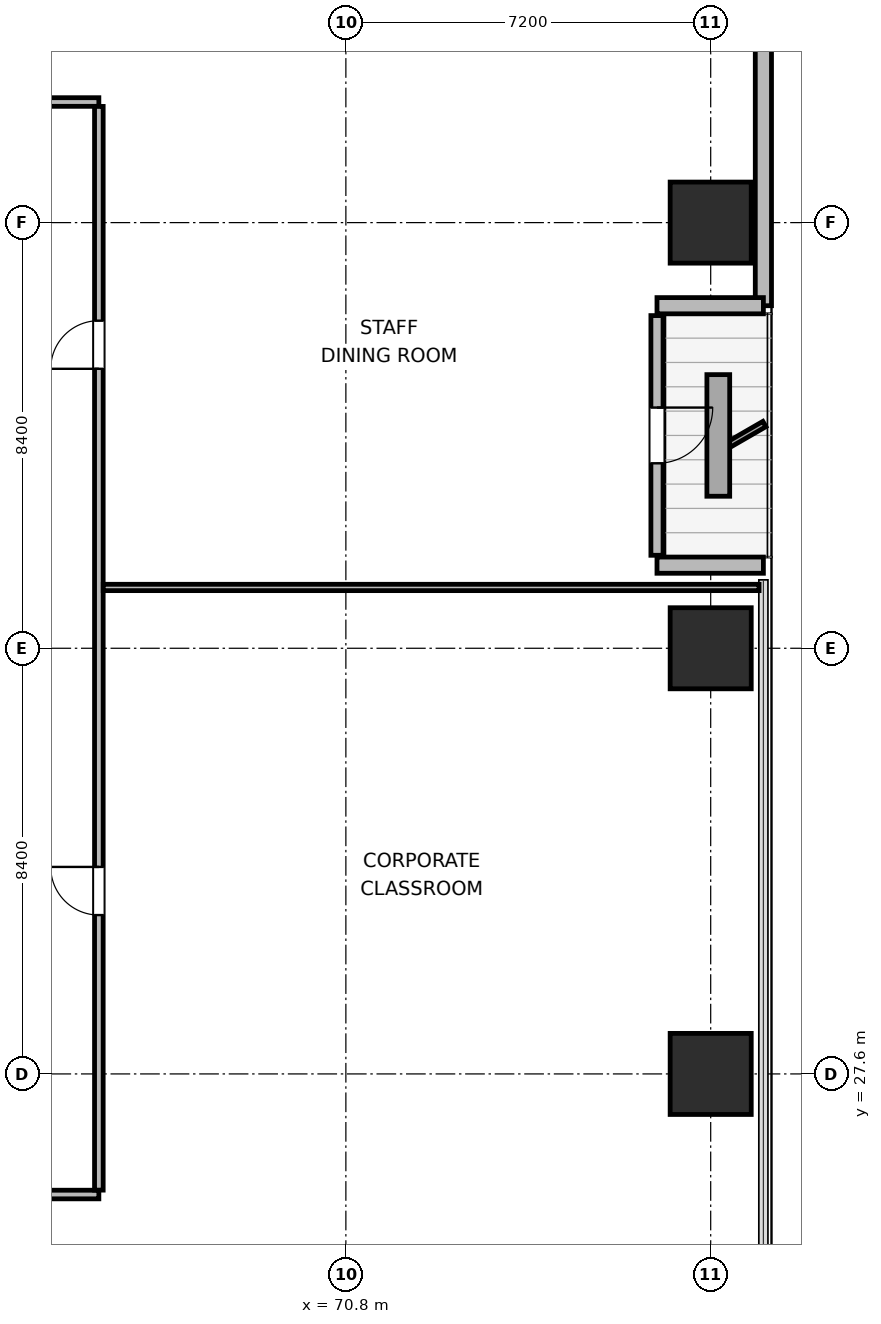
"""IFC4 building model, lengths in metres.
Left out: names, types, materials, properties, quantities, classifications, styles, units other than length and angle.
Written with IfcOpenShell. Run it as: python <this file> out.ifc"""

import sys

from ifc_helpers import new_model, si_unit, direction, frame, frame_2d, origin, origin_2d, place, context, subcontext, project, spatial, rectangle, extrude, element, fill, save


model = new_model("IFC4")
c1 = context("Model", 3, precision=1e-05, world=origin(), true_north=direction((0.0, 1.0)))
c2 = subcontext(c1, "Body", "Model", "MODEL_VIEW")
j1 = project(units=[si_unit("LENGTHUNIT", "METRE"), si_unit("PLANEANGLEUNIT", "RADIAN")], contexts=[c1])
p1 = place(None, origin())
s1 = spatial("IfcSite", under=j1, at=p1, CompositionType="ELEMENT")
p2 = place(p1, origin())
s2 = spatial("IfcBuilding", under=s1, at=p2, CompositionType="ELEMENT")
p3 = place(p2, frame((0.0, 0.0, 41.1)))
s3 = spatial("IfcBuildingStorey", under=s2, at=p3, CompositionType="ELEMENT", Elevation=41.1)
for number, where, z_axis, x_axis in (
    (1, (78.0, 27.6, 0.0), (0.0, 0.0, 1.0), (1.0, 0.0, 0.0)),
    (2, (78.0, 36.0, 0.0), (0.0, 0.0, 1.0), (1.0, 0.0, 0.0)),
    (3, (78.0, 44.4, 0.0), (0.0, 0.0, 1.0), (1.0, 0.0, 0.0)),
):
    element("IfcColumn", number, at=place(p3, frame(where, z_axis=z_axis, x_axis=x_axis)), inside=s3, PredefinedType="COLUMN", context=c2, shape_type="SweptSolid", body=[
        extrude(rectangle(XDim=1.6, YDim=1.6, at=origin_2d()), origin(), (0.0, 0.0, 1.0), 3.9),
    ])
p4 = place(p3, frame((79.04, 56.979, 0.0), z_axis=(0.0, 0.0, 1.0), x_axis=(0.0, -1.0, 0.0)))
e4 = element("IfcWall", 4, at=p4, inside=s3, PredefinedType="SOLIDWALL", context=c2, shape_type="SweptSolid", body=[
    extrude(rectangle(XDim=14.219, YDim=0.32, at=frame_2d((7.109, 0.0))), origin(), (0.0, 0.0, 1.0), 3.64),
])
p5 = place(p3, frame((79.04, 42.76, 0.0), z_axis=(0.0, 0.0, 1.0), x_axis=(-1.0, 0.0, 0.0)))
e5 = element("IfcWall", 5, at=p5, inside=s3, PredefinedType="SOLIDWALL", context=c2, shape_type="SweptSolid", body=[
    extrude(rectangle(XDim=2.1, YDim=0.32, at=frame_2d((1.05, 0.0))), origin(), (0.0, 0.0, 1.0), 2.875),
])
p6 = place(p3, frame((76.94, 42.565, 0.0), z_axis=(0.0, 0.0, 1.0), x_axis=(0.0, -1.0, 0.0)))
e6 = element("IfcWall", 6, at=p6, inside=s3, PredefinedType="SOLIDWALL", context=c2, shape_type="SweptSolid", body=[
    extrude(rectangle(XDim=4.73, YDim=0.24, at=frame_2d((2.365, 0.0))), origin(), (0.0, 0.0, 1.0), 3.162),
])
p7 = place(p6, frame((1.815, 0.0, 0.0)))
e7 = element("IfcOpeningElement", 7, at=p7, cuts=e6, PredefinedType="OPENING", context=c2, shape_type="SweptSolid", body=[
    extrude(rectangle(XDim=1.1, YDim=2.04, at=frame_2d((0.55, 1.02))), frame((0.0, 0.13, 0.0), z_axis=(0.0, -1.0, 0.0), x_axis=(1.0, 0.0, 0.0)), (0.0, 0.0, 1.0), 0.26),
])
p8 = place(p3, frame((76.94, 37.64, 0.0), z_axis=(0.0, 0.0, 1.0), x_axis=(1.0, 0.0, 0.0)))
e8 = element("IfcWall", 8, at=p8, inside=s3, PredefinedType="SOLIDWALL", context=c2, shape_type="SweptSolid", body=[
    extrude(rectangle(XDim=2.1, YDim=0.32, at=frame_2d((1.05, 0.0))), origin(), (0.0, 0.0, 1.0), 2.875),
])
p9 = place(p3, frame((30.075, 25.22, 0.0), z_axis=(0.0, 0.0, 1.0), x_axis=(1.0, 0.0, 0.0)))
e9 = element("IfcWall", 9, at=p9, inside=s3, PredefinedType="PARTITIONING", context=c2, shape_type="SweptSolid", body=[
    extrude(rectangle(XDim=35.85, YDim=0.17, at=frame_2d((17.925, 0.0))), origin(), (0.0, 0.0, 1.0), 3.64),
])
p10 = place(p9, frame((4.308, 0.0, 0.0)))
e10 = element("IfcOpeningElement", 10, at=p10, cuts=e9, PredefinedType="OPENING", context=c2, shape_type="SweptSolid", body=[
    extrude(rectangle(XDim=0.95, YDim=2.04, at=frame_2d((0.475, 1.02))), frame((0.0, 0.095, 0.0), z_axis=(0.0, -1.0, 0.0), x_axis=(1.0, 0.0, 0.0)), (0.0, 0.0, 1.0), 0.19),
])
p11 = place(p9, frame((13.27, 0.0, 0.0)))
e11 = element("IfcOpeningElement", 11, at=p11, cuts=e9, PredefinedType="OPENING", context=c2, shape_type="SweptSolid", body=[
    extrude(rectangle(XDim=0.95, YDim=2.04, at=frame_2d((0.475, 1.02))), frame((0.0, 0.095, 0.0), z_axis=(0.0, -1.0, 0.0), x_axis=(1.0, 0.0, 0.0)), (0.0, 0.0, 1.0), 0.19),
])
p12 = place(p9, frame((21.63, 0.0, 0.0)))
e12 = element("IfcOpeningElement", 12, at=p12, cuts=e9, PredefinedType="OPENING", context=c2, shape_type="SweptSolid", body=[
    extrude(rectangle(XDim=0.95, YDim=2.04, at=frame_2d((0.475, 1.02))), frame((0.0, 0.095, 0.0), z_axis=(0.0, -1.0, 0.0), x_axis=(1.0, 0.0, 0.0)), (0.0, 0.0, 1.0), 0.19),
])
p13 = place(p9, frame((30.592, 0.0, 0.0)))
e13 = element("IfcOpeningElement", 13, at=p13, cuts=e9, PredefinedType="OPENING", context=c2, shape_type="SweptSolid", body=[
    extrude(rectangle(XDim=0.95, YDim=2.04, at=frame_2d((0.475, 1.02))), frame((0.0, 0.095, 0.0), z_axis=(0.0, -1.0, 0.0), x_axis=(1.0, 0.0, 0.0)), (0.0, 0.0, 1.0), 0.19),
])
p14 = place(p3, frame((30.075, 46.78, 0.0), z_axis=(0.0, 0.0, 1.0), x_axis=(1.0, 0.0, 0.0)))
e14 = element("IfcWall", 14, at=p14, inside=s3, PredefinedType="PARTITIONING", context=c2, shape_type="SweptSolid", body=[
    extrude(rectangle(XDim=35.85, YDim=0.17, at=frame_2d((17.925, 0.0))), origin(), (0.0, 0.0, 1.0), 3.64),
])
p15 = place(p14, frame((4.053, 0.0, 0.0)))
e15 = element("IfcOpeningElement", 15, at=p15, cuts=e14, PredefinedType="OPENING", context=c2, shape_type="SweptSolid", body=[
    extrude(rectangle(XDim=0.95, YDim=2.04, at=frame_2d((0.475, 1.02))), frame((0.0, 0.095, 0.0), z_axis=(0.0, -1.0, 0.0), x_axis=(1.0, 0.0, 0.0)), (0.0, 0.0, 1.0), 0.19),
])
p16 = place(p14, frame((11.05, 0.0, 0.0)))
e16 = element("IfcOpeningElement", 16, at=p16, cuts=e14, PredefinedType="OPENING", context=c2, shape_type="SweptSolid", body=[
    extrude(rectangle(XDim=0.95, YDim=2.04, at=frame_2d((0.475, 1.02))), frame((0.0, 0.095, 0.0), z_axis=(0.0, -1.0, 0.0), x_axis=(1.0, 0.0, 0.0)), (0.0, 0.0, 1.0), 0.19),
])
p17 = place(p14, frame((16.55, 0.0, 0.0)))
e17 = element("IfcOpeningElement", 17, at=p17, cuts=e14, PredefinedType="OPENING", context=c2, shape_type="SweptSolid", body=[
    extrude(rectangle(XDim=0.95, YDim=2.04, at=frame_2d((0.475, 1.02))), frame((0.0, 0.095, 0.0), z_axis=(0.0, -1.0, 0.0), x_axis=(1.0, 0.0, 0.0)), (0.0, 0.0, 1.0), 0.19),
])
p18 = place(p14, frame((20.82, 0.0, 0.0)))
e18 = element("IfcOpeningElement", 18, at=p18, cuts=e14, PredefinedType="OPENING", context=c2, shape_type="SweptSolid", body=[
    extrude(rectangle(XDim=0.95, YDim=2.04, at=frame_2d((0.475, 1.02))), frame((0.0, 0.095, 0.0), z_axis=(0.0, -1.0, 0.0), x_axis=(1.0, 0.0, 0.0)), (0.0, 0.0, 1.0), 0.19),
])
p19 = place(p14, frame((25.985, 0.0, 0.0)))
e19 = element("IfcOpeningElement", 19, at=p19, cuts=e14, PredefinedType="OPENING", context=c2, shape_type="SweptSolid", body=[
    extrude(rectangle(XDim=0.95, YDim=2.04, at=frame_2d((0.475, 1.02))), frame((0.0, 0.095, 0.0), z_axis=(0.0, -1.0, 0.0), x_axis=(1.0, 0.0, 0.0)), (0.0, 0.0, 1.0), 0.19),
])
p20 = place(p14, frame((32.643, 0.0, 0.0)))
e20 = element("IfcOpeningElement", 20, at=p20, cuts=e14, PredefinedType="OPENING", context=c2, shape_type="SweptSolid", body=[
    extrude(rectangle(XDim=0.95, YDim=2.04, at=frame_2d((0.475, 1.02))), frame((0.0, 0.095, 0.0), z_axis=(0.0, -1.0, 0.0), x_axis=(1.0, 0.0, 0.0)), (0.0, 0.0, 1.0), 0.19),
])
p21 = place(p3, frame((65.925, 25.307, 0.0), z_axis=(0.0, 0.0, 1.0), x_axis=(0.0, 1.0, 0.0)))
e21 = element("IfcWall", 21, at=p21, inside=s3, PredefinedType="PARTITIONING", context=c2, shape_type="SweptSolid", body=[
    extrude(rectangle(XDim=21.386, YDim=0.17, at=frame_2d((10.693, 0.0))), origin(), (0.0, 0.0, 1.0), 3.64),
])
p22 = place(p21, frame((5.428, 0.0, 0.0)))
e22 = element("IfcOpeningElement", 22, at=p22, cuts=e21, PredefinedType="OPENING", context=c2, shape_type="SweptSolid", body=[
    extrude(rectangle(XDim=0.95, YDim=2.04, at=frame_2d((0.475, 1.02))), frame((0.0, 0.095, 0.0), z_axis=(0.0, -1.0, 0.0), x_axis=(1.0, 0.0, 0.0)), (0.0, 0.0, 1.0), 0.19),
])
p23 = place(p21, frame((16.208, 0.0, 0.0)))
e23 = element("IfcOpeningElement", 23, at=p23, cuts=e21, PredefinedType="OPENING", context=c2, shape_type="SweptSolid", body=[
    extrude(rectangle(XDim=0.95, YDim=2.04, at=frame_2d((0.475, 1.02))), frame((0.0, 0.095, 0.0), z_axis=(0.0, -1.0, 0.0), x_axis=(1.0, 0.0, 0.0)), (0.0, 0.0, 1.0), 0.19),
])
p24 = place(p3, frame((66.012, 37.2, 0.0), z_axis=(0.0, 0.0, 1.0), x_axis=(1.0, 0.0, 0.0)))
e24 = element("IfcWall", 24, at=p24, inside=s3, PredefinedType="PARTITIONING", context=c2, shape_type="SweptSolid", body=[
    extrude(rectangle(XDim=12.943, YDim=0.125, at=frame_2d((6.472, 0.0))), origin(), (0.0, 0.0, 1.0), 3.64),
])
p25 = place(p7, origin())
e25 = element("IfcDoor", 25, at=p25, inside=s3, OperationType="SINGLE_SWING_LEFT", PredefinedType="DOOR", context=c2, shape_type="SweptSolid", body=[
    extrude(rectangle(XDim=1.1, YDim=2.04, at=frame_2d((0.55, 1.02))), frame((0.0, 0.025, 0.0), z_axis=(0.0, -1.0, 0.0), x_axis=(1.0, 0.0, 0.0)), (0.0, 0.0, 1.0), 0.05),
])
fill(e7, e25)
p26 = place(p22, origin())
e26 = element("IfcDoor", 26, at=p26, inside=s3, OperationType="SINGLE_SWING_RIGHT", PredefinedType="DOOR", context=c2, shape_type="SweptSolid", body=[
    extrude(rectangle(XDim=0.95, YDim=2.04, at=frame_2d((0.475, 1.02))), frame((0.0, 0.025, 0.0), z_axis=(0.0, -1.0, 0.0), x_axis=(1.0, 0.0, 0.0)), (0.0, 0.0, 1.0), 0.05),
])
fill(e22, e26)
p27 = place(p23, origin())
e27 = element("IfcDoor", 27, at=p27, inside=s3, OperationType="SINGLE_SWING_LEFT", PredefinedType="DOOR", context=c2, shape_type="SweptSolid", body=[
    extrude(rectangle(XDim=0.95, YDim=2.04, at=frame_2d((0.475, 1.02))), frame((0.0, 0.025, 0.0), z_axis=(0.0, -1.0, 0.0), x_axis=(1.0, 0.0, 0.0)), (0.0, 0.0, 1.0), 0.05),
])
fill(e23, e27)
save(model, sys.argv[1])
